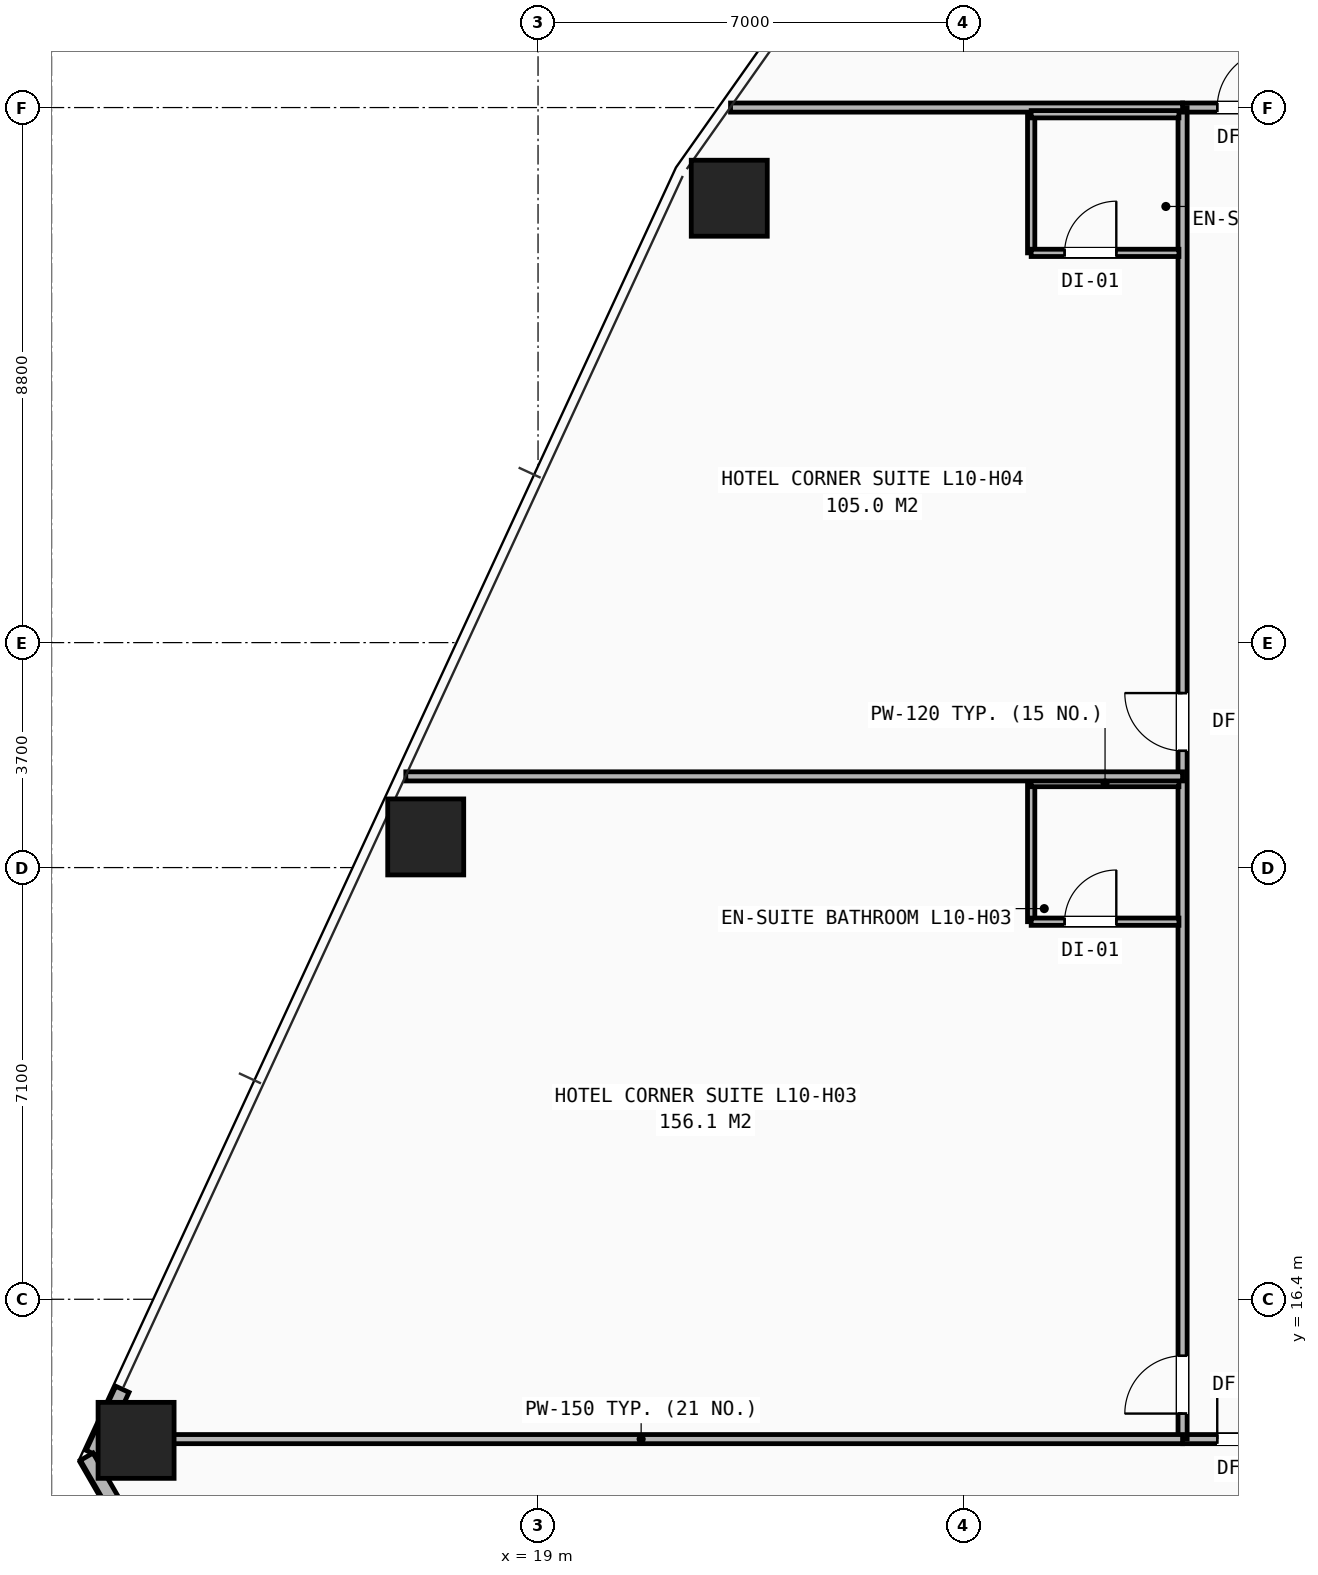
"""IFC4 building model, lengths in metres.
Left out: names, types, materials, properties, quantities, classifications, styles, units other than length and angle.
Written with IfcOpenShell. Run it as: python <this file> out.ifc"""

import sys

from ifc_helpers import new_model, si_unit, direction, frame, frame_2d, origin, origin_2d, place, context, subcontext, project, spatial, rectangle, hollow_rectangle, extrude, element, fill, save


model = new_model("IFC4")
c1 = context("Model", 3, precision=1e-05, world=origin(), true_north=direction((0.0, 1.0)))
c2 = subcontext(c1, "Body", "Model", "MODEL_VIEW")
j1 = project(units=[si_unit("LENGTHUNIT", "METRE"), si_unit("PLANEANGLEUNIT", "RADIAN")], contexts=[c1])
p1 = place(None, origin())
s1 = spatial("IfcSite", under=j1, at=p1, CompositionType="ELEMENT")
p2 = place(p1, origin())
s2 = spatial("IfcBuilding", under=s1, at=p2, CompositionType="ELEMENT")
p3 = place(p2, frame((0.0, 0.0, 40.0)))
s3 = spatial("IfcBuildingStorey", under=s2, at=p3, CompositionType="ELEMENT", Elevation=40.0)
for number, where, z_axis, x_axis in (
    (1, (22.145, 34.509, 0.0), (0.0, 0.0, 1.0), (1.0, 0.0, 0.0)),
    (2, (17.153, 24.004, 0.0), (0.0, 0.0, 1.0), (1.0, 0.0, 0.0)),
    (3, (12.389, 14.08, 0.0), (0.0, 0.0, 1.0), (1.0, 0.0, 0.0)),
):
    element("IfcColumn", number, at=place(p3, frame(where, z_axis=z_axis, x_axis=x_axis)), inside=s3, PredefinedType="COLUMN", context=c2, shape_type="SweptSolid", body=[
        extrude(hollow_rectangle(XDim=1.25, YDim=1.25, WallThickness=0.08, at=origin_2d()), origin(), (0.0, 0.0, 1.0), 3.2),
    ])
p4 = place(p3, frame((12.164, 14.919, 0.0), z_axis=(0.0, 0.0, 1.0), x_axis=(-0.419364442242, -0.907817968859, 0.0)))
e4 = element("IfcWall", 4, at=p4, inside=s3, PredefinedType="SHEAR", context=c2, shape_type="SweptSolid", body=[
    extrude(rectangle(XDim=1.163, YDim=0.24, at=frame_2d((0.581, 0.0))), origin(), (0.0, 0.0, 1.0), 2.263),
])
p5 = place(p3, frame((16.792, 4.78, 0.0), z_axis=(0.0, 0.0, 1.0), x_axis=(-0.500011568057, 0.866018724861, 0.0)))
e5 = element("IfcWall", 5, at=p5, inside=s3, PredefinedType="SHEAR", context=c2, shape_type="SweptSolid", body=[
    extrude(rectangle(XDim=10.428, YDim=0.24, at=frame_2d((5.214, 0.0))), origin(), (0.0, 0.0, 1.0), 2.263),
])
p6 = place(p3, frame((29.6, 14.1, 0.0), z_axis=(0.0, 0.0, 1.0), x_axis=(1.0, 0.0, 0.0)))
e6 = element("IfcWall", 6, at=p6, inside=s3, PredefinedType="PARTITIONING", context=c2, shape_type="SweptSolid", body=[
    extrude(rectangle(XDim=20.8, YDim=0.15, at=frame_2d((10.4, 0.0))), origin(), (0.0, 0.0, 1.0), 2.431),
])
p7 = place(p6, frame((0.57, 0.0, 0.0)))
e7 = element("IfcOpeningElement", 7, at=p7, cuts=e6, PredefinedType="OPENING", context=c2, shape_type="SweptSolid", body=[
    extrude(rectangle(XDim=0.95, YDim=2.1, at=frame_2d((0.475, 1.05))), frame((0.0, 0.085, 0.0), z_axis=(0.0, -1.0, 0.0), x_axis=(1.0, 0.0, 0.0)), (0.0, 0.0, 1.0), 0.17),
])
p8 = place(p6, frame((10.32, 0.0, 0.0)))
e8 = element("IfcOpeningElement", 8, at=p8, cuts=e6, PredefinedType="OPENING", context=c2, shape_type="SweptSolid", body=[
    extrude(rectangle(XDim=0.95, YDim=2.1, at=frame_2d((0.475, 1.05))), frame((0.0, 0.085, 0.0), z_axis=(0.0, -1.0, 0.0), x_axis=(1.0, 0.0, 0.0)), (0.0, 0.0, 1.0), 0.17),
])
p9 = place(p3, frame((29.6, 36.0, 0.0), z_axis=(0.0, 0.0, 1.0), x_axis=(1.0, 0.0, 0.0)))
e9 = element("IfcWall", 9, at=p9, inside=s3, PredefinedType="PARTITIONING", context=c2, shape_type="SweptSolid", body=[
    extrude(rectangle(XDim=9.65, YDim=0.15, at=frame_2d((4.825, 0.0))), origin(), (0.0, 0.0, 1.0), 2.98),
])
p10 = place(p9, frame((0.57, 0.0, 0.0)))
e10 = element("IfcOpeningElement", 10, at=p10, cuts=e9, PredefinedType="OPENING", context=c2, shape_type="SweptSolid", body=[
    extrude(rectangle(XDim=0.95, YDim=2.1, at=frame_2d((0.475, 1.05))), frame((0.0, 0.085, 0.0), z_axis=(0.0, -1.0, 0.0), x_axis=(1.0, 0.0, 0.0)), (0.0, 0.0, 1.0), 0.17),
])
p11 = place(p3, frame((29.6, 14.1, 0.0), z_axis=(0.0, 0.0, 1.0), x_axis=(0.0, 1.0, 0.0)))
e11 = element("IfcWall", 11, at=p11, inside=s3, PredefinedType="PARTITIONING", context=c2, shape_type="SweptSolid", body=[
    extrude(rectangle(XDim=21.9, YDim=0.15, at=frame_2d((10.95, 0.0))), origin(), (0.0, 0.0, 1.0), 2.431),
])
p12 = place(p11, frame((0.42, 0.0, 0.0)))
e12 = element("IfcOpeningElement", 12, at=p12, cuts=e11, PredefinedType="OPENING", context=c2, shape_type="SweptSolid", body=[
    extrude(rectangle(XDim=0.95, YDim=2.1, at=frame_2d((0.475, 1.05))), frame((0.0, 0.085, 0.0), z_axis=(0.0, -1.0, 0.0), x_axis=(1.0, 0.0, 0.0)), (0.0, 0.0, 1.0), 0.17),
])
p13 = place(p11, frame((11.32, 0.0, 0.0)))
e13 = element("IfcOpeningElement", 13, at=p13, cuts=e11, PredefinedType="OPENING", context=c2, shape_type="SweptSolid", body=[
    extrude(rectangle(XDim=0.95, YDim=2.1, at=frame_2d((0.475, 1.05))), frame((0.0, 0.085, 0.0), z_axis=(0.0, -1.0, 0.0), x_axis=(1.0, 0.0, 0.0)), (0.0, 0.0, 1.0), 0.17),
])
p14 = place(p3, frame((11.791, 14.1, 0.0), z_axis=(0.0, 0.0, 1.0), x_axis=(1.0, 0.0, 0.0)))
e14 = element("IfcWall", 14, at=p14, inside=s3, PredefinedType="PARTITIONING", context=c2, shape_type="SweptSolid", body=[
    extrude(rectangle(XDim=17.809, YDim=0.15, at=frame_2d((8.904, 0.0))), origin(), (0.0, 0.0, 1.0), 2.268),
])
p15 = place(p3, frame((22.166, 36.0, 0.0), z_axis=(0.0, 0.0, 1.0), x_axis=(1.0, 0.0, 0.0)))
e15 = element("IfcWall", 15, at=p15, inside=s3, PredefinedType="PARTITIONING", context=c2, shape_type="SweptSolid", body=[
    extrude(rectangle(XDim=7.434, YDim=0.15, at=frame_2d((3.717, 0.0))), origin(), (0.0, 0.0, 1.0), 2.268),
])
p16 = place(p3, frame((27.11, 22.61, 0.0), z_axis=(0.0, 0.0, 1.0), x_axis=(0.0, 1.0, 0.0)))
e16 = element("IfcWall", 16, at=p16, inside=s3, PredefinedType="PARTITIONING", context=c2, shape_type="SweptSolid", body=[
    extrude(rectangle(XDim=2.28, YDim=0.12, at=frame_2d((1.14, 0.0))), origin(), (0.0, 0.0, 1.0), 2.98),
])
p17 = place(p3, frame((27.11, 22.61, 0.0), z_axis=(0.0, 0.0, 1.0), x_axis=(1.0, 0.0, 0.0)))
e17 = element("IfcWall", 17, at=p17, inside=s3, PredefinedType="PARTITIONING", context=c2, shape_type="SweptSolid", body=[
    extrude(rectangle(XDim=2.43, YDim=0.12, at=frame_2d((1.215, 0.0))), origin(), (0.0, 0.0, 1.0), 2.98),
])
p18 = place(p17, frame((0.55, 0.0, 0.0)))
e18 = element("IfcOpeningElement", 18, at=p18, cuts=e17, PredefinedType="OPENING", context=c2, shape_type="SweptSolid", body=[
    extrude(rectangle(XDim=0.85, YDim=2.05, at=frame_2d((0.425, 1.025))), frame((0.0, 0.07, 0.0), z_axis=(0.0, -1.0, 0.0), x_axis=(1.0, 0.0, 0.0)), (0.0, 0.0, 1.0), 0.14),
])
p19 = place(p3, frame((27.11, 24.89, 0.0), z_axis=(0.0, 0.0, 1.0), x_axis=(1.0, 0.0, 0.0)))
e19 = element("IfcWall", 19, at=p19, inside=s3, PredefinedType="PARTITIONING", context=c2, shape_type="SweptSolid", body=[
    extrude(rectangle(XDim=2.43, YDim=0.12, at=frame_2d((1.215, 0.0))), origin(), (0.0, 0.0, 1.0), 2.98),
])
p20 = place(p3, frame((16.825, 25.0, 0.0), z_axis=(0.0, 0.0, 1.0), x_axis=(1.0, 0.0, 0.0)))
e20 = element("IfcWall", 20, at=p20, inside=s3, PredefinedType="PARTITIONING", context=c2, shape_type="SweptSolid", body=[
    extrude(rectangle(XDim=12.775, YDim=0.15, at=frame_2d((6.387, 0.0))), origin(), (0.0, 0.0, 1.0), 2.268),
])
p21 = place(p3, frame((27.11, 33.61, 0.0), z_axis=(0.0, 0.0, 1.0), x_axis=(0.0, 1.0, 0.0)))
e21 = element("IfcWall", 21, at=p21, inside=s3, PredefinedType="PARTITIONING", context=c2, shape_type="SweptSolid", body=[
    extrude(rectangle(XDim=2.28, YDim=0.12, at=frame_2d((1.14, 0.0))), origin(), (0.0, 0.0, 1.0), 2.513),
])
p22 = place(p3, frame((27.11, 33.61, 0.0), z_axis=(0.0, 0.0, 1.0), x_axis=(1.0, 0.0, 0.0)))
e22 = element("IfcWall", 22, at=p22, inside=s3, PredefinedType="PARTITIONING", context=c2, shape_type="SweptSolid", body=[
    extrude(rectangle(XDim=2.43, YDim=0.12, at=frame_2d((1.215, 0.0))), origin(), (0.0, 0.0, 1.0), 2.513),
])
p23 = place(p22, frame((0.55, 0.0, 0.0)))
e23 = element("IfcOpeningElement", 23, at=p23, cuts=e22, PredefinedType="OPENING", context=c2, shape_type="SweptSolid", body=[
    extrude(rectangle(XDim=0.85, YDim=2.05, at=frame_2d((0.425, 1.025))), frame((0.0, 0.07, 0.0), z_axis=(0.0, -1.0, 0.0), x_axis=(1.0, 0.0, 0.0)), (0.0, 0.0, 1.0), 0.14),
])
p24 = place(p3, frame((27.11, 35.89, 0.0), z_axis=(0.0, 0.0, 1.0), x_axis=(1.0, 0.0, 0.0)))
e24 = element("IfcWall", 24, at=p24, inside=s3, PredefinedType="PARTITIONING", context=c2, shape_type="SweptSolid", body=[
    extrude(rectangle(XDim=2.43, YDim=0.12, at=frame_2d((1.215, 0.0))), origin(), (0.0, 0.0, 1.0), 2.513),
])
p25 = place(p7, origin())
e25 = element("IfcDoor", 25, at=p25, inside=s3, OperationType="SINGLE_SWING_LEFT", PredefinedType="DOOR", context=c2, shape_type="SweptSolid", body=[
    extrude(rectangle(XDim=0.95, YDim=2.1, at=frame_2d((0.475, 1.05))), frame((0.0, 0.025, 0.0), z_axis=(0.0, -1.0, 0.0), x_axis=(1.0, 0.0, 0.0)), (0.0, 0.0, 1.0), 0.05),
])
fill(e7, e25)
p26 = place(p12, origin())
e26 = element("IfcDoor", 26, at=p26, inside=s3, OperationType="SINGLE_SWING_LEFT", PredefinedType="DOOR", context=c2, shape_type="SweptSolid", body=[
    extrude(rectangle(XDim=0.95, YDim=2.1, at=frame_2d((0.475, 1.05))), frame((0.0, 0.025, 0.0), z_axis=(0.0, -1.0, 0.0), x_axis=(1.0, 0.0, 0.0)), (0.0, 0.0, 1.0), 0.05),
])
fill(e12, e26)
p27 = place(p18, origin())
e27 = element("IfcDoor", 27, at=p27, inside=s3, OperationType="SINGLE_SWING_RIGHT", PredefinedType="DOOR", context=c2, shape_type="SweptSolid", body=[
    extrude(rectangle(XDim=0.85, YDim=2.05, at=frame_2d((0.425, 1.025))), frame((0.0, 0.025, 0.0), z_axis=(0.0, -1.0, 0.0), x_axis=(1.0, 0.0, 0.0)), (0.0, 0.0, 1.0), 0.05),
])
fill(e18, e27)
p28 = place(p13, origin())
e28 = element("IfcDoor", 28, at=p28, inside=s3, OperationType="SINGLE_SWING_RIGHT", PredefinedType="DOOR", context=c2, shape_type="SweptSolid", body=[
    extrude(rectangle(XDim=0.95, YDim=2.1, at=frame_2d((0.475, 1.05))), frame((0.0, 0.025, 0.0), z_axis=(0.0, -1.0, 0.0), x_axis=(1.0, 0.0, 0.0)), (0.0, 0.0, 1.0), 0.05),
])
fill(e13, e28)
p29 = place(p23, origin())
e29 = element("IfcDoor", 29, at=p29, inside=s3, OperationType="SINGLE_SWING_RIGHT", PredefinedType="DOOR", context=c2, shape_type="SweptSolid", body=[
    extrude(rectangle(XDim=0.85, YDim=2.05, at=frame_2d((0.425, 1.025))), frame((0.0, 0.025, 0.0), z_axis=(0.0, -1.0, 0.0), x_axis=(1.0, 0.0, 0.0)), (0.0, 0.0, 1.0), 0.05),
])
fill(e23, e29)
p30 = place(p10, origin())
e30 = element("IfcDoor", 30, at=p30, inside=s3, OperationType="SINGLE_SWING_RIGHT", PredefinedType="DOOR", context=c2, shape_type="SweptSolid", body=[
    extrude(rectangle(XDim=0.95, YDim=2.1, at=frame_2d((0.475, 1.05))), frame((0.0, 0.025, 0.0), z_axis=(0.0, -1.0, 0.0), x_axis=(1.0, 0.0, 0.0)), (0.0, 0.0, 1.0), 0.05),
])
fill(e10, e30)
save(model, sys.argv[1])
